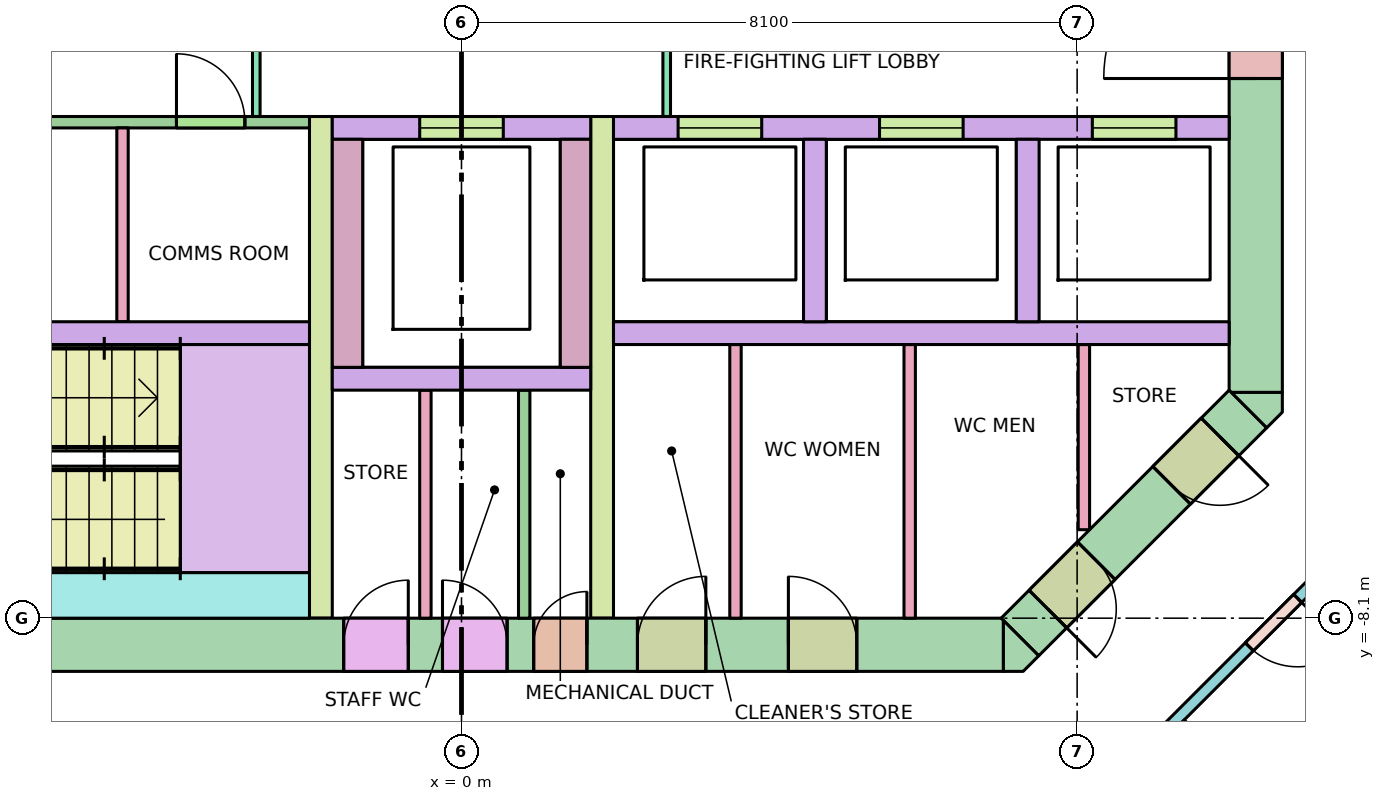
"""IFC4 building model, lengths in metres.
Left out: names, types, materials, properties, quantities, classifications, styles, units other than length and angle.
Written with IfcOpenShell. Run it as: python <this file> out.ifc"""

import sys

from ifc_helpers import new_model, si_unit, direction, frame, frame_2d, origin, place, context, subcontext, project, spatial, polyline, rectangle, outline, extrude, element, fill, save


model = new_model("IFC4")
c1 = context("Model", 3, precision=1e-05, world=origin(), true_north=direction((0.0, 1.0)))
c2 = subcontext(c1, "Body", "Model", "MODEL_VIEW")
j1 = project(units=[si_unit("LENGTHUNIT", "METRE"), si_unit("PLANEANGLEUNIT", "RADIAN")], contexts=[c1])
p1 = place(None, origin())
s1 = spatial("IfcSite", under=j1, at=p1, CompositionType="ELEMENT")
p2 = place(p1, origin())
s2 = spatial("IfcBuilding", under=s1, at=p2, CompositionType="ELEMENT")
p3 = place(p2, frame((0.0, 0.0, 226.1)))
s3 = spatial("IfcBuildingStorey", under=s2, at=p3, CompositionType="ELEMENT", Elevation=226.1)
p4 = place(p3, frame((-7.13, -8.45, -0.28), z_axis=(0.0, 0.0, 1.0), x_axis=(1.0, 0.0, 0.0)))
e1 = element("IfcWall", 1, at=p4, inside=s3, PredefinedType="SHEAR", context=c2, shape_type="SweptSolid", body=[
    extrude(rectangle(XDim=14.26, YDim=0.7, at=frame_2d((7.13, 0.0))), origin(), (0.0, 0.0, 1.0), 3.7),
])
p5 = place(p4, frame((8.08, 0.0, 0.28)))
e2 = element("IfcOpeningElement", 2, at=p5, cuts=e1, PredefinedType="OPENING", context=c2, shape_type="SweptSolid", body=[
    extrude(rectangle(XDim=0.7, YDim=2.1, at=frame_2d((0.35, 1.05))), frame((0.0, 0.36, 0.0), z_axis=(0.0, -1.0, 0.0), x_axis=(1.0, 0.0, 0.0)), (0.0, 0.0, 1.0), 0.72),
])
p6 = place(p4, frame((5.58, 0.0, 0.28)))
e3 = element("IfcOpeningElement", 3, at=p6, cuts=e1, PredefinedType="OPENING", context=c2, shape_type="SweptSolid", body=[
    extrude(rectangle(XDim=0.85, YDim=2.1, at=frame_2d((0.425, 1.05))), frame((0.0, 0.36, 0.0), z_axis=(0.0, -1.0, 0.0), x_axis=(1.0, 0.0, 0.0)), (0.0, 0.0, 1.0), 0.72),
])
p7 = place(p4, frame((6.88, 0.0, 0.28)))
e4 = element("IfcOpeningElement", 4, at=p7, cuts=e1, PredefinedType="OPENING", context=c2, shape_type="SweptSolid", body=[
    extrude(rectangle(XDim=0.85, YDim=2.1, at=frame_2d((0.425, 1.05))), frame((0.0, 0.36, 0.0), z_axis=(0.0, -1.0, 0.0), x_axis=(1.0, 0.0, 0.0)), (0.0, 0.0, 1.0), 0.72),
])
p8 = place(p4, frame((9.445, 0.0, 0.28)))
e5 = element("IfcOpeningElement", 5, at=p8, cuts=e1, PredefinedType="OPENING", context=c2, shape_type="SweptSolid", body=[
    extrude(rectangle(XDim=0.9, YDim=2.1, at=frame_2d((0.45, 1.05))), frame((0.0, 0.36, 0.0), z_axis=(0.0, -1.0, 0.0), x_axis=(1.0, 0.0, 0.0)), (0.0, 0.0, 1.0), 0.72),
])
p9 = place(p4, frame((11.431, 0.0, 0.28)))
e6 = element("IfcOpeningElement", 6, at=p9, cuts=e1, PredefinedType="OPENING", context=c2, shape_type="SweptSolid", body=[
    extrude(rectangle(XDim=0.9, YDim=2.1, at=frame_2d((0.45, 1.05))), frame((0.0, 0.36, 0.0), z_axis=(0.0, -1.0, 0.0), x_axis=(1.0, 0.0, 0.0)), (0.0, 0.0, 1.0), 0.72),
])
p10 = place(p3, frame((10.45, -5.13, -0.28), z_axis=(0.0, 0.0, 1.0), x_axis=(0.0, 1.0, 0.0)))
e7 = element("IfcWall", 7, at=p10, inside=s3, PredefinedType="SHEAR", context=c2, shape_type="SweptSolid", body=[
    extrude(rectangle(XDim=10.26, YDim=0.7, at=frame_2d((5.13, 0.0))), origin(), (0.0, 0.0, 1.0), 3.7),
])
p11 = place(p10, frame((4.13, 0.0, 0.28)))
e8 = element("IfcOpeningElement", 8, at=p11, cuts=e7, PredefinedType="OPENING", context=c2, shape_type="SweptSolid", body=[
    extrude(rectangle(XDim=2.0, YDim=2.1, at=frame_2d((1.0, 1.05))), frame((0.0, 0.36, 0.0), z_axis=(0.0, -1.0, 0.0), x_axis=(1.0, 0.0, 0.0)), (0.0, 0.0, 1.0), 0.72),
])
p12 = place(p3, frame((10.347, -5.347, -0.28), z_axis=(0.0, 0.0, 1.0), x_axis=(-0.707106781187, -0.707106781187, 0.0)))
e9 = element("IfcWall", 9, at=p12, inside=s3, PredefinedType="SHEAR", context=c2, shape_type="SweptSolid", body=[
    extrude(rectangle(XDim=4.243, YDim=0.7, at=frame_2d((2.121, 0.0))), origin(), (0.0, 0.0, 1.0), 3.7),
])
p13 = place(p12, frame((2.823, 0.0, 0.28)))
e10 = element("IfcOpeningElement", 10, at=p13, cuts=e9, PredefinedType="OPENING", context=c2, shape_type="SweptSolid", body=[
    extrude(rectangle(XDim=0.9, YDim=2.1, at=frame_2d((0.45, 1.05))), frame((0.0, 0.36, 0.0), z_axis=(0.0, -1.0, 0.0), x_axis=(1.0, 0.0, 0.0)), (0.0, 0.0, 1.0), 0.72),
])
p14 = place(p12, frame((0.52, 0.0, 0.28)))
e11 = element("IfcOpeningElement", 11, at=p14, cuts=e9, PredefinedType="OPENING", context=c2, shape_type="SweptSolid", body=[
    extrude(rectangle(XDim=0.9, YDim=2.1, at=frame_2d((0.45, 1.05))), frame((0.0, 0.36, 0.0), z_axis=(0.0, -1.0, 0.0), x_axis=(1.0, 0.0, 0.0)), (0.0, 0.0, 1.0), 0.72),
])
p15 = place(p3, frame((0.0, 0.0, -0.28)))
e12 = element("IfcWall", 12, at=p15, inside=s3, PredefinedType="SHEAR", context=c2, shape_type="SweptSolid", body=[
    extrude(outline(polyline([(7.39, -8.8), (7.13, -8.8), (7.13, -8.8), (7.13, -8.13), (7.595, -8.595), (7.595, -8.595), (7.595, -8.595), (7.39, -8.8)])), origin(), (0.0, 0.0, 1.0), 3.7),
])
p16 = place(p3, frame((0.0, 0.0, -0.28)))
e13 = element("IfcWall", 13, at=p16, inside=s3, PredefinedType="SHEAR", context=c2, shape_type="SweptSolid", body=[
    extrude(outline(polyline([(10.8, -5.39), (10.595, -5.595), (10.595, -5.595), (10.595, -5.595), (10.13, -5.13), (10.8, -5.13), (10.8, -5.13), (10.8, -5.39)])), origin(), (0.0, 0.0, 1.0), 3.7),
])
for number, where, z_axis, x_axis in (
    (14, (-10.1, -4.35, 0.0), (0.0, 0.0, 1.0), (1.0, 0.0, 0.0)),
    (15, (2.0, -4.35, 0.0), (0.0, 0.0, 1.0), (1.0, 0.0, 0.0)),
):
    element("IfcWall", number, at=place(p3, frame(where, z_axis=z_axis, x_axis=x_axis)), inside=s3, PredefinedType="SOLIDWALL", context=c2, shape_type="SweptSolid", body=[
        extrude(rectangle(XDim=8.1, YDim=0.3, at=frame_2d((4.05, 0.0))), origin(), (0.0, 0.0, 1.0), 3.42),
    ])
p17 = place(p3, frame((2.0, -1.65, 0.0), z_axis=(0.0, 0.0, 1.0), x_axis=(1.0, 0.0, 0.0)))
e16 = element("IfcWall", 16, at=p17, inside=s3, PredefinedType="SOLIDWALL", context=c2, shape_type="SweptSolid", body=[
    extrude(rectangle(XDim=8.1, YDim=0.3, at=frame_2d((4.05, 0.0))), origin(), (0.0, 0.0, 1.0), 3.42),
])
p18 = place(p17, frame((0.85, 0.0, 0.0)))
e17 = element("IfcOpeningElement", 17, at=p18, cuts=e16, PredefinedType="OPENING", context=c2, shape_type="SweptSolid", body=[
    extrude(rectangle(XDim=1.1, YDim=2.1, at=frame_2d((0.55, 1.05))), frame((0.0, 0.16, 0.0), z_axis=(0.0, -1.0, 0.0), x_axis=(1.0, 0.0, 0.0)), (0.0, 0.0, 1.0), 0.32),
])
p19 = place(p17, frame((3.5, 0.0, 0.0)))
e18 = element("IfcOpeningElement", 18, at=p19, cuts=e16, PredefinedType="OPENING", context=c2, shape_type="SweptSolid", body=[
    extrude(rectangle(XDim=1.1, YDim=2.1, at=frame_2d((0.55, 1.05))), frame((0.0, 0.16, 0.0), z_axis=(0.0, -1.0, 0.0), x_axis=(1.0, 0.0, 0.0)), (0.0, 0.0, 1.0), 0.32),
])
p20 = place(p17, frame((6.3, 0.0, 0.0)))
e19 = element("IfcOpeningElement", 19, at=p20, cuts=e16, PredefinedType="OPENING", context=c2, shape_type="SweptSolid", body=[
    extrude(rectangle(XDim=1.1, YDim=2.1, at=frame_2d((0.55, 1.05))), frame((0.0, 0.16, 0.0), z_axis=(0.0, -1.0, 0.0), x_axis=(1.0, 0.0, 0.0)), (0.0, 0.0, 1.0), 0.32),
])
for number, where, z_axis, x_axis in (
    (20, (4.65, -4.2, 0.0), (0.0, 0.0, 1.0), (0.0, 1.0, 0.0)),
    (21, (7.45, -4.2, 0.0), (0.0, 0.0, 1.0), (0.0, 1.0, 0.0)),
):
    element("IfcWall", number, at=place(p3, frame(where, z_axis=z_axis, x_axis=x_axis)), inside=s3, PredefinedType="SOLIDWALL", context=c2, shape_type="SweptSolid", body=[
        extrude(rectangle(XDim=2.4, YDim=0.3, at=frame_2d((1.2, 0.0))), origin(), (0.0, 0.0, 1.0), 3.42),
    ])
for number, where, z_axis, x_axis in (
    (22, (-1.85, -8.1, 0.0), (0.0, 0.0, 1.0), (0.0, 1.0, 0.0)),
    (23, (1.85, -8.1, 0.0), (0.0, 0.0, 1.0), (0.0, 1.0, 0.0)),
):
    element("IfcWall", number, at=place(p3, frame(where, z_axis=z_axis, x_axis=x_axis)), inside=s3, PredefinedType="SHEAR", context=c2, shape_type="SweptSolid", body=[
        extrude(rectangle(XDim=6.6, YDim=0.3, at=frame_2d((3.3, 0.0))), origin(), (0.0, 0.0, 1.0), 3.42),
    ])
p21 = place(p3, frame((-1.7, -1.65, 0.0), z_axis=(0.0, 0.0, 1.0), x_axis=(1.0, 0.0, 0.0)))
e24 = element("IfcWall", 24, at=p21, inside=s3, PredefinedType="SOLIDWALL", context=c2, shape_type="SweptSolid", body=[
    extrude(rectangle(XDim=3.4, YDim=0.3, at=frame_2d((1.7, 0.0))), origin(), (0.0, 0.0, 1.0), 3.42),
])
p22 = place(p21, frame((1.15, 0.0, 0.0)))
e25 = element("IfcOpeningElement", 25, at=p22, cuts=e24, PredefinedType="OPENING", context=c2, shape_type="SweptSolid", body=[
    extrude(rectangle(XDim=1.1, YDim=2.1, at=frame_2d((0.55, 1.05))), frame((0.0, 0.16, 0.0), z_axis=(0.0, -1.0, 0.0), x_axis=(1.0, 0.0, 0.0)), (0.0, 0.0, 1.0), 0.32),
])
for number, where, z_axis, x_axis in (
    (26, (-1.5, -4.8, 0.0), (0.0, 0.0, 1.0), (0.0, 1.0, 0.0)),
    (27, (1.5, -4.8, 0.0), (0.0, 0.0, 1.0), (0.0, 1.0, 0.0)),
):
    element("IfcWall", number, at=place(p3, frame(where, z_axis=z_axis, x_axis=x_axis)), inside=s3, PredefinedType="SOLIDWALL", context=c2, shape_type="SweptSolid", body=[
        extrude(rectangle(XDim=3.0, YDim=0.4, at=frame_2d((1.5, 0.0))), origin(), (0.0, 0.0, 1.0), 3.42),
    ])
p23 = place(p3, frame((-1.7, -4.95, 0.0), z_axis=(0.0, 0.0, 1.0), x_axis=(1.0, 0.0, 0.0)))
e28 = element("IfcWall", 28, at=p23, inside=s3, PredefinedType="SOLIDWALL", context=c2, shape_type="SweptSolid", body=[
    extrude(rectangle(XDim=3.4, YDim=0.3, at=frame_2d((1.7, 0.0))), origin(), (0.0, 0.0, 1.0), 3.42),
])
p24 = place(p3, frame((-7.37, -7.8, 0.0), z_axis=(0.0, 0.0, 1.0), x_axis=(1.0, 0.0, 0.0)))
e29 = element("IfcWall", 29, at=p24, inside=s3, PredefinedType="SHEAR", context=c2, shape_type="SweptSolid", body=[
    extrude(rectangle(XDim=5.37, YDim=0.6, at=frame_2d((2.685, 0.0))), origin(), (0.0, 0.0, 1.0), 3.42),
])
p25 = place(p3, frame((-2.7, -1.5, 0.0), z_axis=(0.0, 0.0, 1.0), x_axis=(0.0, 1.0, 0.0)))
e30 = element("IfcWall", 30, at=p25, inside=s3, PredefinedType="PARTITIONING", context=c2, shape_type="SweptSolid", body=[
    extrude(rectangle(XDim=3.0, YDim=0.1, at=frame_2d((1.5, 0.0))), origin(), (0.0, 0.0, 1.0), 3.42),
])
p26 = place(p25, frame((0.9, 0.0, 0.0)))
e31 = element("IfcOpeningElement", 31, at=p26, cuts=e30, PredefinedType="OPENING", context=c2, shape_type="SweptSolid", body=[
    extrude(rectangle(XDim=1.2, YDim=2.1, at=frame_2d((0.6, 1.05))), frame((0.0, 0.06, 0.0), z_axis=(0.0, -1.0, 0.0), x_axis=(1.0, 0.0, 0.0)), (0.0, 0.0, 1.0), 0.12),
])
p27 = place(p3, frame((2.7, -1.5, 0.0), z_axis=(0.0, 0.0, 1.0), x_axis=(0.0, 1.0, 0.0)))
e32 = element("IfcWall", 32, at=p27, inside=s3, PredefinedType="PARTITIONING", context=c2, shape_type="SweptSolid", body=[
    extrude(rectangle(XDim=3.0, YDim=0.1, at=frame_2d((1.5, 0.0))), origin(), (0.0, 0.0, 1.0), 3.42),
])
p28 = place(p27, frame((0.9, 0.0, 0.0)))
e33 = element("IfcOpeningElement", 33, at=p28, cuts=e32, PredefinedType="OPENING", context=c2, shape_type="SweptSolid", body=[
    extrude(rectangle(XDim=1.2, YDim=2.1, at=frame_2d((0.6, 1.05))), frame((0.0, 0.06, 0.0), z_axis=(0.0, -1.0, 0.0), x_axis=(1.0, 0.0, 0.0)), (0.0, 0.0, 1.0), 0.12),
])
for number, where, z_axis, x_axis in (
    (34, (0.825, -8.1, 0.0), (0.0, 0.0, 1.0), (0.0, 1.0, 0.0)),
    (35, (-0.475, -8.1, 0.0), (0.0, 0.0, 1.0), (0.0, 1.0, 0.0)),
):
    element("IfcWall", number, at=place(p3, frame(where, z_axis=z_axis, x_axis=x_axis)), inside=s3, PredefinedType="PARTITIONING", context=c2, shape_type="SweptSolid", body=[
        extrude(rectangle(XDim=3.0, YDim=0.15, at=frame_2d((1.5, 0.0))), origin(), (0.0, 0.0, 1.0), 3.42),
    ])
for number, where, z_axis, x_axis in (
    (36, (3.605, -8.1, 0.0), (0.0, 0.0, 1.0), (0.0, 1.0, 0.0)),
    (37, (5.897, -8.1, 0.0), (0.0, 0.0, 1.0), (0.0, 1.0, 0.0)),
):
    element("IfcWall", number, at=place(p3, frame(where, z_axis=z_axis, x_axis=x_axis)), inside=s3, PredefinedType="PARTITIONING", context=c2, shape_type="SweptSolid", body=[
        extrude(rectangle(XDim=3.6, YDim=0.15, at=frame_2d((1.8, 0.0))), origin(), (0.0, 0.0, 1.0), 3.42),
    ])
p29 = place(p3, frame((8.189, -6.936, 0.0), z_axis=(0.0, 0.0, 1.0), x_axis=(0.0, 1.0, 0.0)))
e38 = element("IfcWall", 38, at=p29, inside=s3, PredefinedType="PARTITIONING", context=c2, shape_type="SweptSolid", body=[
    extrude(rectangle(XDim=2.436, YDim=0.15, at=frame_2d((1.218, 0.0))), origin(), (0.0, 0.0, 1.0), 3.42),
])
p30 = place(p3, frame((-4.46, -4.2, 0.0), z_axis=(0.0, 0.0, 1.0), x_axis=(0.0, 1.0, 0.0)))
e39 = element("IfcWall", 39, at=p30, inside=s3, PredefinedType="PARTITIONING", context=c2, shape_type="SweptSolid", body=[
    extrude(rectangle(XDim=2.55, YDim=0.15, at=frame_2d((1.275, 0.0))), origin(), (0.0, 0.0, 1.0), 3.42),
])
p31 = place(p3, frame((-10.1, -1.575, 0.0), z_axis=(0.0, 0.0, 1.0), x_axis=(1.0, 0.0, 0.0)))
e40 = element("IfcWall", 40, at=p31, inside=s3, PredefinedType="PARTITIONING", context=c2, shape_type="SweptSolid", body=[
    extrude(rectangle(XDim=8.1, YDim=0.15, at=frame_2d((4.05, 0.0))), origin(), (0.0, 0.0, 1.0), 3.42),
])
p32 = place(p31, frame((2.333, 0.0, 0.0)))
e41 = element("IfcOpeningElement", 41, at=p32, cuts=e40, PredefinedType="OPENING", context=c2, shape_type="SweptSolid", body=[
    extrude(rectangle(XDim=0.9, YDim=2.1, at=frame_2d((0.45, 1.05))), frame((0.0, 0.085, 0.0), z_axis=(0.0, -1.0, 0.0), x_axis=(1.0, 0.0, 0.0)), (0.0, 0.0, 1.0), 0.17),
])
p33 = place(p31, frame((6.35, 0.0, 0.0)))
e42 = element("IfcOpeningElement", 42, at=p33, cuts=e40, PredefinedType="OPENING", context=c2, shape_type="SweptSolid", body=[
    extrude(rectangle(XDim=0.9, YDim=2.1, at=frame_2d((0.45, 1.05))), frame((0.0, 0.085, 0.0), z_axis=(0.0, -1.0, 0.0), x_axis=(1.0, 0.0, 0.0)), (0.0, 0.0, 1.0), 0.17),
])
p34 = place(p3, frame((12.638, -6.204, 0.0), z_axis=(0.0, 0.0, 1.0), x_axis=(-0.707106781187, -0.707106781187, 0.0)))
e43 = element("IfcWall", 43, at=p34, inside=s3, PredefinedType="PARTITIONING", context=c2, shape_type="SweptSolid", body=[
    extrude(rectangle(XDim=6.271, YDim=0.15, at=frame_2d((3.135, 0.0))), origin(), (0.0, 0.0, 1.0), 2.57),
])
p35 = place(p34, frame((4.935, 0.0, 0.0)))
e44 = element("IfcOpeningElement", 44, at=p35, cuts=e43, PredefinedType="OPENING", context=c2, shape_type="SweptSolid", body=[
    extrude(rectangle(XDim=0.9, YDim=2.1, at=frame_2d((0.45, 1.05))), frame((0.0, 0.085, 0.0), z_axis=(0.0, -1.0, 0.0), x_axis=(1.0, 0.0, 0.0)), (0.0, 0.0, 1.0), 0.17),
])
p36 = place(p34, frame((2.314, 0.0, 0.0)))
e45 = element("IfcOpeningElement", 45, at=p36, cuts=e43, PredefinedType="OPENING", context=c2, shape_type="SweptSolid", body=[
    extrude(rectangle(XDim=0.9, YDim=2.1, at=frame_2d((0.45, 1.05))), frame((0.0, 0.085, 0.0), z_axis=(0.0, -1.0, 0.0), x_axis=(1.0, 0.0, 0.0)), (0.0, 0.0, 1.0), 0.17),
])
p37 = place(p3, frame((9.474, -9.474, 0.0), z_axis=(0.0, 0.0, 1.0), x_axis=(0.707106781187, -0.707106781187, 0.0)))
e46 = element("IfcWall", 46, at=p37, inside=s3, PredefinedType="PARTITIONING", context=c2, shape_type="SweptSolid", body=[
    extrude(rectangle(XDim=6.938, YDim=0.1, at=frame_2d((3.469, 0.0))), origin(), (0.0, 0.0, 1.0), 2.57),
])
p38 = place(p18, origin())
e47 = element("IfcDoor", 47, at=p38, inside=s3, OperationType="DOUBLE_DOOR_SLIDING", PredefinedType="DOOR", context=c2, shape_type="SweptSolid", body=[
    extrude(rectangle(XDim=1.1, YDim=2.1, at=frame_2d((0.55, 1.05))), frame((0.0, 0.025, 0.0), z_axis=(0.0, -1.0, 0.0), x_axis=(1.0, 0.0, 0.0)), (0.0, 0.0, 1.0), 0.05),
])
fill(e17, e47)
p39 = place(p19, origin())
e48 = element("IfcDoor", 48, at=p39, inside=s3, OperationType="DOUBLE_DOOR_SLIDING", PredefinedType="DOOR", context=c2, shape_type="SweptSolid", body=[
    extrude(rectangle(XDim=1.1, YDim=2.1, at=frame_2d((0.55, 1.05))), frame((0.0, 0.025, 0.0), z_axis=(0.0, -1.0, 0.0), x_axis=(1.0, 0.0, 0.0)), (0.0, 0.0, 1.0), 0.05),
])
fill(e18, e48)
p40 = place(p20, origin())
e49 = element("IfcDoor", 49, at=p40, inside=s3, OperationType="DOUBLE_DOOR_SLIDING", PredefinedType="DOOR", context=c2, shape_type="SweptSolid", body=[
    extrude(rectangle(XDim=1.1, YDim=2.1, at=frame_2d((0.55, 1.05))), frame((0.0, 0.025, 0.0), z_axis=(0.0, -1.0, 0.0), x_axis=(1.0, 0.0, 0.0)), (0.0, 0.0, 1.0), 0.05),
])
fill(e19, e49)
p41 = place(p22, origin())
e50 = element("IfcDoor", 50, at=p41, inside=s3, OperationType="DOUBLE_DOOR_SLIDING", PredefinedType="DOOR", context=c2, shape_type="SweptSolid", body=[
    extrude(rectangle(XDim=1.1, YDim=2.1, at=frame_2d((0.55, 1.05))), frame((0.0, 0.025, 0.0), z_axis=(0.0, -1.0, 0.0), x_axis=(1.0, 0.0, 0.0)), (0.0, 0.0, 1.0), 0.05),
])
fill(e25, e50)
p42 = place(p11, origin())
e51 = element("IfcDoor", 51, at=p42, inside=s3, OperationType="DOUBLE_DOOR_SINGLE_SWING", PredefinedType="DOOR", context=c2, shape_type="SweptSolid", body=[
    extrude(rectangle(XDim=2.0, YDim=2.1, at=frame_2d((1.0, 1.05))), frame((0.0, 0.025, 0.0), z_axis=(0.0, -1.0, 0.0), x_axis=(1.0, 0.0, 0.0)), (0.0, 0.0, 1.0), 0.05),
])
fill(e8, e51)
p43 = place(p5, origin())
e52 = element("IfcDoor", 52, at=p43, inside=s3, OperationType="SINGLE_SWING_RIGHT", PredefinedType="DOOR", context=c2, shape_type="SweptSolid", body=[
    extrude(rectangle(XDim=0.7, YDim=2.1, at=frame_2d((0.35, 1.05))), frame((0.0, 0.025, 0.0), z_axis=(0.0, -1.0, 0.0), x_axis=(1.0, 0.0, 0.0)), (0.0, 0.0, 1.0), 0.05),
])
fill(e2, e52)
p44 = place(p6, origin())
e53 = element("IfcDoor", 53, at=p44, inside=s3, OperationType="SINGLE_SWING_RIGHT", PredefinedType="DOOR", context=c2, shape_type="SweptSolid", body=[
    extrude(rectangle(XDim=0.85, YDim=2.1, at=frame_2d((0.425, 1.05))), frame((0.0, 0.025, 0.0), z_axis=(0.0, -1.0, 0.0), x_axis=(1.0, 0.0, 0.0)), (0.0, 0.0, 1.0), 0.05),
])
fill(e3, e53)
p45 = place(p7, origin())
e54 = element("IfcDoor", 54, at=p45, inside=s3, OperationType="SINGLE_SWING_LEFT", PredefinedType="DOOR", context=c2, shape_type="SweptSolid", body=[
    extrude(rectangle(XDim=0.85, YDim=2.1, at=frame_2d((0.425, 1.05))), frame((0.0, 0.025, 0.0), z_axis=(0.0, -1.0, 0.0), x_axis=(1.0, 0.0, 0.0)), (0.0, 0.0, 1.0), 0.05),
])
fill(e4, e54)
p46 = place(p8, origin())
e55 = element("IfcDoor", 55, at=p46, inside=s3, OperationType="SINGLE_SWING_RIGHT", PredefinedType="DOOR", context=c2, shape_type="SweptSolid", body=[
    extrude(rectangle(XDim=0.9, YDim=2.1, at=frame_2d((0.45, 1.05))), frame((0.0, 0.025, 0.0), z_axis=(0.0, -1.0, 0.0), x_axis=(1.0, 0.0, 0.0)), (0.0, 0.0, 1.0), 0.05),
])
fill(e5, e55)
p47 = place(p9, origin())
e56 = element("IfcDoor", 56, at=p47, inside=s3, OperationType="SINGLE_SWING_LEFT", PredefinedType="DOOR", context=c2, shape_type="SweptSolid", body=[
    extrude(rectangle(XDim=0.9, YDim=2.1, at=frame_2d((0.45, 1.05))), frame((0.0, 0.025, 0.0), z_axis=(0.0, -1.0, 0.0), x_axis=(1.0, 0.0, 0.0)), (0.0, 0.0, 1.0), 0.05),
])
fill(e6, e56)
p48 = place(p13, origin())
e57 = element("IfcDoor", 57, at=p48, inside=s3, OperationType="SINGLE_SWING_RIGHT", PredefinedType="DOOR", context=c2, shape_type="SweptSolid", body=[
    extrude(rectangle(XDim=0.9, YDim=2.1, at=frame_2d((0.45, 1.05))), frame((0.0, 0.025, 0.0), z_axis=(0.0, -1.0, 0.0), x_axis=(1.0, 0.0, 0.0)), (0.0, 0.0, 1.0), 0.05),
])
fill(e10, e57)
p49 = place(p14, origin())
e58 = element("IfcDoor", 58, at=p49, inside=s3, OperationType="SINGLE_SWING_LEFT", PredefinedType="DOOR", context=c2, shape_type="SweptSolid", body=[
    extrude(rectangle(XDim=0.9, YDim=2.1, at=frame_2d((0.45, 1.05))), frame((0.0, 0.025, 0.0), z_axis=(0.0, -1.0, 0.0), x_axis=(1.0, 0.0, 0.0)), (0.0, 0.0, 1.0), 0.05),
])
fill(e11, e58)
p50 = place(p33, origin())
e59 = element("IfcDoor", 59, at=p50, inside=s3, OperationType="SINGLE_SWING_LEFT", PredefinedType="DOOR", context=c2, shape_type="SweptSolid", body=[
    extrude(rectangle(XDim=0.9, YDim=2.1, at=frame_2d((0.45, 1.05))), frame((0.0, 0.025, 0.0), z_axis=(0.0, -1.0, 0.0), x_axis=(1.0, 0.0, 0.0)), (0.0, 0.0, 1.0), 0.05),
])
fill(e42, e59)
p51 = place(p36, origin())
e60 = element("IfcDoor", 60, at=p51, inside=s3, OperationType="SINGLE_SWING_LEFT", PredefinedType="DOOR", context=c2, shape_type="SweptSolid", body=[
    extrude(rectangle(XDim=0.9, YDim=2.1, at=frame_2d((0.45, 1.05))), frame((0.0, 0.025, 0.0), z_axis=(0.0, -1.0, 0.0), x_axis=(1.0, 0.0, 0.0)), (0.0, 0.0, 1.0), 0.05),
])
fill(e45, e60)
save(model, sys.argv[1])
